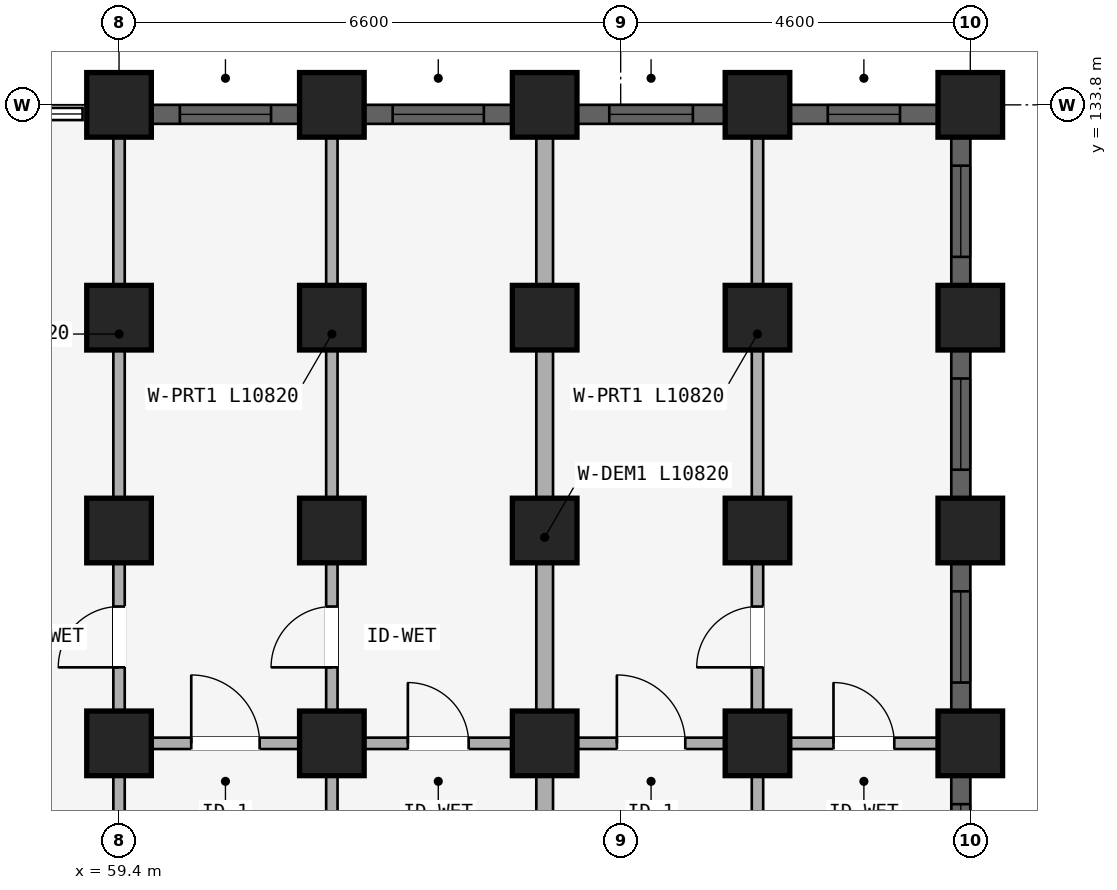
"""IFC4 building model, lengths in metres.
Left out: names, types, materials, properties, quantities, classifications, styles, units other than length and angle.
Written with IfcOpenShell. Run it as: python <this file> out.ifc"""

import sys

from ifc_helpers import new_model, si_unit, direction, frame, frame_2d, origin, origin_2d, place, context, subcontext, project, spatial, rectangle, extrude, element, fill, save


model = new_model("IFC4")
c1 = context("Model", 3, precision=1e-05, world=origin(), true_north=direction((0.0, 1.0)))
c2 = subcontext(c1, "Body", "Model", "MODEL_VIEW")
j1 = project(units=[si_unit("LENGTHUNIT", "METRE"), si_unit("PLANEANGLEUNIT", "RADIAN")], contexts=[c1])
p1 = place(None, origin())
s1 = spatial("IfcSite", under=j1, at=p1, CompositionType="ELEMENT")
p2 = place(p1, origin())
s2 = spatial("IfcBuilding", under=s1, at=p2, CompositionType="ELEMENT")
p3 = place(p2, frame((0.0, 0.0, 4.5)))
s3 = spatial("IfcBuildingStorey", under=s2, at=p3, CompositionType="ELEMENT", Elevation=4.5)
for number, where, z_axis, x_axis in (
    (1, (59.4, 125.4, 0.0), (0.0, 0.0, 1.0), (1.0, 0.0, 0.0)),
    (2, (59.4, 128.2, 0.0), (0.0, 0.0, 1.0), (1.0, 0.0, 0.0)),
    (3, (59.4, 131.0, 0.0), (0.0, 0.0, 1.0), (1.0, 0.0, 0.0)),
    (4, (59.4, 133.8, 0.0), (0.0, 0.0, 1.0), (1.0, 0.0, 0.0)),
    (5, (62.2, 125.4, 0.0), (0.0, 0.0, 1.0), (1.0, 0.0, 0.0)),
    (6, (62.2, 128.2, 0.0), (0.0, 0.0, 1.0), (1.0, 0.0, 0.0)),
    (7, (62.2, 131.0, 0.0), (0.0, 0.0, 1.0), (1.0, 0.0, 0.0)),
    (8, (62.2, 133.8, 0.0), (0.0, 0.0, 1.0), (1.0, 0.0, 0.0)),
    (9, (65.0, 125.4, 0.0), (0.0, 0.0, 1.0), (1.0, 0.0, 0.0)),
    (10, (65.0, 128.2, 0.0), (0.0, 0.0, 1.0), (1.0, 0.0, 0.0)),
    (11, (65.0, 131.0, 0.0), (0.0, 0.0, 1.0), (1.0, 0.0, 0.0)),
    (12, (65.0, 133.8, 0.0), (0.0, 0.0, 1.0), (1.0, 0.0, 0.0)),
    (13, (67.8, 125.4, 0.0), (0.0, 0.0, 1.0), (1.0, 0.0, 0.0)),
    (14, (67.8, 128.2, 0.0), (0.0, 0.0, 1.0), (1.0, 0.0, 0.0)),
    (15, (67.8, 131.0, 0.0), (0.0, 0.0, 1.0), (1.0, 0.0, 0.0)),
    (16, (67.8, 133.8, 0.0), (0.0, 0.0, 1.0), (1.0, 0.0, 0.0)),
    (17, (70.6, 125.4, 0.0), (0.0, 0.0, 1.0), (1.0, 0.0, 0.0)),
    (18, (70.6, 128.2, 0.0), (0.0, 0.0, 1.0), (1.0, 0.0, 0.0)),
    (19, (70.6, 131.0, 0.0), (0.0, 0.0, 1.0), (1.0, 0.0, 0.0)),
    (20, (70.6, 133.8, 0.0), (0.0, 0.0, 1.0), (1.0, 0.0, 0.0)),
):
    element("IfcColumn", number, at=place(p3, frame(where, z_axis=z_axis, x_axis=x_axis)), inside=s3, PredefinedType="COLUMN", context=c2, shape_type="SweptSolid", body=[
        extrude(rectangle(XDim=0.85, YDim=0.85, at=origin_2d()), origin(), (0.0, 0.0, 1.0), 3.98),
    ])
p4 = place(p3, frame((59.48, 125.4, 0.0), z_axis=(0.0, 0.0, 1.0), x_axis=(1.0, 0.0, 0.0)))
e21 = element("IfcWall", 21, at=p4, inside=s3, PredefinedType="PLUMBINGWALL", context=c2, shape_type="SweptSolid", body=[
    extrude(rectangle(XDim=2.64, YDim=0.15, at=frame_2d((1.32, 0.0))), origin(), (0.0, 0.0, 1.0), 3.322),
])
p5 = place(p4, frame((0.87, 0.0, 0.0)))
e22 = element("IfcOpeningElement", 22, at=p5, cuts=e21, PredefinedType="OPENING", context=c2, shape_type="SweptSolid", body=[
    extrude(rectangle(XDim=0.9, YDim=2.1, at=frame_2d((0.45, 1.05))), frame((0.0, 0.085, 0.0), z_axis=(0.0, -1.0, 0.0), x_axis=(1.0, 0.0, 0.0)), (0.0, 0.0, 1.0), 0.17),
])
p6 = place(p3, frame((62.28, 125.4, 0.0), z_axis=(0.0, 0.0, 1.0), x_axis=(1.0, 0.0, 0.0)))
e23 = element("IfcWall", 23, at=p6, inside=s3, PredefinedType="PLUMBINGWALL", context=c2, shape_type="SweptSolid", body=[
    extrude(rectangle(XDim=2.64, YDim=0.15, at=frame_2d((1.32, 0.0))), origin(), (0.0, 0.0, 1.0), 3.322),
])
p7 = place(p6, frame((0.92, 0.0, 0.0)))
e24 = element("IfcOpeningElement", 24, at=p7, cuts=e23, PredefinedType="OPENING", context=c2, shape_type="SweptSolid", body=[
    extrude(rectangle(XDim=0.8, YDim=2.1, at=frame_2d((0.4, 1.05))), frame((0.0, 0.085, 0.0), z_axis=(0.0, -1.0, 0.0), x_axis=(1.0, 0.0, 0.0)), (0.0, 0.0, 1.0), 0.17),
])
p8 = place(p3, frame((65.08, 125.4, 0.0), z_axis=(0.0, 0.0, 1.0), x_axis=(1.0, 0.0, 0.0)))
e25 = element("IfcWall", 25, at=p8, inside=s3, PredefinedType="PLUMBINGWALL", context=c2, shape_type="SweptSolid", body=[
    extrude(rectangle(XDim=2.64, YDim=0.15, at=frame_2d((1.32, 0.0))), origin(), (0.0, 0.0, 1.0), 3.322),
])
p9 = place(p8, frame((0.87, 0.0, 0.0)))
e26 = element("IfcOpeningElement", 26, at=p9, cuts=e25, PredefinedType="OPENING", context=c2, shape_type="SweptSolid", body=[
    extrude(rectangle(XDim=0.9, YDim=2.1, at=frame_2d((0.45, 1.05))), frame((0.0, 0.085, 0.0), z_axis=(0.0, -1.0, 0.0), x_axis=(1.0, 0.0, 0.0)), (0.0, 0.0, 1.0), 0.17),
])
p10 = place(p3, frame((67.88, 125.4, 0.0), z_axis=(0.0, 0.0, 1.0), x_axis=(1.0, 0.0, 0.0)))
e27 = element("IfcWall", 27, at=p10, inside=s3, PredefinedType="PLUMBINGWALL", context=c2, shape_type="SweptSolid", body=[
    extrude(rectangle(XDim=2.64, YDim=0.15, at=frame_2d((1.32, 0.0))), origin(), (0.0, 0.0, 1.0), 3.322),
])
p11 = place(p10, frame((0.92, 0.0, 0.0)))
e28 = element("IfcOpeningElement", 28, at=p11, cuts=e27, PredefinedType="OPENING", context=c2, shape_type="SweptSolid", body=[
    extrude(rectangle(XDim=0.8, YDim=2.1, at=frame_2d((0.4, 1.05))), frame((0.0, 0.085, 0.0), z_axis=(0.0, -1.0, 0.0), x_axis=(1.0, 0.0, 0.0)), (0.0, 0.0, 1.0), 0.17),
])
p12 = place(p3, frame((59.4, 122.7, 0.0), z_axis=(0.0, 0.0, 1.0), x_axis=(0.0, 1.0, 0.0)))
e29 = element("IfcWall", 29, at=p12, inside=s3, PredefinedType="PARTITIONING", context=c2, shape_type="SweptSolid", body=[
    extrude(rectangle(XDim=10.82, YDim=0.15, at=frame_2d((5.41, 0.0))), origin(), (0.0, 0.0, 1.0), 3.322),
])
p13 = place(p12, frame((3.7, 0.0, 0.0)))
e30 = element("IfcOpeningElement", 30, at=p13, cuts=e29, PredefinedType="OPENING", context=c2, shape_type="SweptSolid", body=[
    extrude(rectangle(XDim=0.8, YDim=2.1, at=frame_2d((0.4, 1.05))), frame((0.0, 0.085, 0.0), z_axis=(0.0, -1.0, 0.0), x_axis=(1.0, 0.0, 0.0)), (0.0, 0.0, 1.0), 0.17),
])
p14 = place(p3, frame((62.2, 122.7, 0.0), z_axis=(0.0, 0.0, 1.0), x_axis=(0.0, 1.0, 0.0)))
e31 = element("IfcWall", 31, at=p14, inside=s3, PredefinedType="PARTITIONING", context=c2, shape_type="SweptSolid", body=[
    extrude(rectangle(XDim=10.82, YDim=0.15, at=frame_2d((5.41, 0.0))), origin(), (0.0, 0.0, 1.0), 3.322),
])
p15 = place(p14, frame((3.7, 0.0, 0.0)))
e32 = element("IfcOpeningElement", 32, at=p15, cuts=e31, PredefinedType="OPENING", context=c2, shape_type="SweptSolid", body=[
    extrude(rectangle(XDim=0.8, YDim=2.1, at=frame_2d((0.4, 1.05))), frame((0.0, 0.085, 0.0), z_axis=(0.0, -1.0, 0.0), x_axis=(1.0, 0.0, 0.0)), (0.0, 0.0, 1.0), 0.17),
])
p16 = place(p3, frame((65.0, 122.7, 0.0), z_axis=(0.0, 0.0, 1.0), x_axis=(0.0, 1.0, 0.0)))
e33 = element("IfcWall", 33, at=p16, inside=s3, PredefinedType="STANDARD", context=c2, shape_type="SweptSolid", body=[
    extrude(rectangle(XDim=10.82, YDim=0.22, at=frame_2d((5.41, 0.0))), origin(), (0.0, 0.0, 1.0), 3.322),
])
p17 = place(p3, frame((67.8, 122.7, 0.0), z_axis=(0.0, 0.0, 1.0), x_axis=(0.0, 1.0, 0.0)))
e34 = element("IfcWall", 34, at=p17, inside=s3, PredefinedType="PARTITIONING", context=c2, shape_type="SweptSolid", body=[
    extrude(rectangle(XDim=10.82, YDim=0.15, at=frame_2d((5.41, 0.0))), origin(), (0.0, 0.0, 1.0), 3.322),
])
p18 = place(p17, frame((3.7, 0.0, 0.0)))
e35 = element("IfcOpeningElement", 35, at=p18, cuts=e34, PredefinedType="OPENING", context=c2, shape_type="SweptSolid", body=[
    extrude(rectangle(XDim=0.8, YDim=2.1, at=frame_2d((0.4, 1.05))), frame((0.0, 0.085, 0.0), z_axis=(0.0, -1.0, 0.0), x_axis=(1.0, 0.0, 0.0)), (0.0, 0.0, 1.0), 0.17),
])
p19 = place(p3, frame((59.829, 133.675, 0.0), z_axis=(0.0, 0.0, 1.0), x_axis=(1.0, 0.0, 0.0)))
e36 = element("IfcWall", 36, at=p19, inside=s3, PredefinedType="STANDARD", context=c2, shape_type="SweptSolid", body=[
    extrude(rectangle(XDim=1.943, YDim=0.25, at=frame_2d((0.971, 0.0))), origin(), (0.0, 0.0, 1.0), 3.522),
])
p20 = place(p19, frame((0.372, 0.0, 0.88)))
e37 = element("IfcOpeningElement", 37, at=p20, cuts=e36, PredefinedType="OPENING", context=c2, shape_type="SweptSolid", body=[
    extrude(rectangle(XDim=1.2, YDim=1.5, at=frame_2d((0.6, 0.75))), frame((0.0, 0.135, 0.0), z_axis=(0.0, -1.0, 0.0), x_axis=(1.0, 0.0, 0.0)), (0.0, 0.0, 1.0), 0.27),
])
p21 = place(p3, frame((62.628, 133.675, 0.0), z_axis=(0.0, 0.0, 1.0), x_axis=(1.0, 0.0, 0.0)))
e38 = element("IfcWall", 38, at=p21, inside=s3, PredefinedType="STANDARD", context=c2, shape_type="SweptSolid", body=[
    extrude(rectangle(XDim=1.943, YDim=0.25, at=frame_2d((0.972, 0.0))), origin(), (0.0, 0.0, 1.0), 3.522),
])
p22 = place(p21, frame((0.372, 0.0, 0.88)))
e39 = element("IfcOpeningElement", 39, at=p22, cuts=e38, PredefinedType="OPENING", context=c2, shape_type="SweptSolid", body=[
    extrude(rectangle(XDim=1.2, YDim=1.5, at=frame_2d((0.6, 0.75))), frame((0.0, 0.135, 0.0), z_axis=(0.0, -1.0, 0.0), x_axis=(1.0, 0.0, 0.0)), (0.0, 0.0, 1.0), 0.27),
])
p23 = place(p3, frame((65.428, 133.675, 0.0), z_axis=(0.0, 0.0, 1.0), x_axis=(1.0, 0.0, 0.0)))
e40 = element("IfcWall", 40, at=p23, inside=s3, PredefinedType="STANDARD", context=c2, shape_type="SweptSolid", body=[
    extrude(rectangle(XDim=1.943, YDim=0.25, at=frame_2d((0.972, 0.0))), origin(), (0.0, 0.0, 1.0), 3.522),
])
p24 = place(p23, frame((0.421, 0.0, 0.88)))
e41 = element("IfcOpeningElement", 41, at=p24, cuts=e40, PredefinedType="OPENING", context=c2, shape_type="SweptSolid", body=[
    extrude(rectangle(XDim=1.1, YDim=1.45, at=frame_2d((0.55, 0.725))), frame((0.0, 0.135, 0.0), z_axis=(0.0, -1.0, 0.0), x_axis=(1.0, 0.0, 0.0)), (0.0, 0.0, 1.0), 0.27),
])
p25 = place(p3, frame((68.229, 133.675, 0.0), z_axis=(0.0, 0.0, 1.0), x_axis=(1.0, 0.0, 0.0)))
e42 = element("IfcWall", 42, at=p25, inside=s3, PredefinedType="STANDARD", context=c2, shape_type="SweptSolid", body=[
    extrude(rectangle(XDim=1.943, YDim=0.25, at=frame_2d((0.971, 0.0))), origin(), (0.0, 0.0, 1.0), 3.522),
])
p26 = place(p25, frame((0.497, 0.0, 0.88)))
e43 = element("IfcOpeningElement", 43, at=p26, cuts=e42, PredefinedType="OPENING", context=c2, shape_type="SweptSolid", body=[
    extrude(rectangle(XDim=0.95, YDim=1.35, at=frame_2d((0.475, 0.675))), frame((0.0, 0.135, 0.0), z_axis=(0.0, -1.0, 0.0), x_axis=(1.0, 0.0, 0.0)), (0.0, 0.0, 1.0), 0.27),
])
p27 = place(p3, frame((70.475, 123.02, 0.0), z_axis=(0.0, 0.0, 1.0), x_axis=(0.0, 1.0, 0.0)))
e44 = element("IfcWall", 44, at=p27, inside=s3, PredefinedType="STANDARD", context=c2, shape_type="SweptSolid", body=[
    extrude(rectangle(XDim=1.96, YDim=0.25, at=frame_2d((0.98, 0.0))), origin(), (0.0, 0.0, 1.0), 3.322),
])
p28 = place(p27, frame((0.38, 0.0, 0.88)))
e45 = element("IfcOpeningElement", 45, at=p28, cuts=e44, PredefinedType="OPENING", context=c2, shape_type="SweptSolid", body=[
    extrude(rectangle(XDim=1.2, YDim=1.5, at=frame_2d((0.6, 0.75))), frame((0.0, 0.135, 0.0), z_axis=(0.0, -1.0, 0.0), x_axis=(1.0, 0.0, 0.0)), (0.0, 0.0, 1.0), 0.27),
])
p29 = place(p3, frame((70.475, 125.82, 0.0), z_axis=(0.0, 0.0, 1.0), x_axis=(0.0, 1.0, 0.0)))
e46 = element("IfcWall", 46, at=p29, inside=s3, PredefinedType="STANDARD", context=c2, shape_type="SweptSolid", body=[
    extrude(rectangle(XDim=1.96, YDim=0.25, at=frame_2d((0.98, 0.0))), origin(), (0.0, 0.0, 1.0), 3.322),
])
p30 = place(p29, frame((0.38, 0.0, 0.88)))
e47 = element("IfcOpeningElement", 47, at=p30, cuts=e46, PredefinedType="OPENING", context=c2, shape_type="SweptSolid", body=[
    extrude(rectangle(XDim=1.2, YDim=1.5, at=frame_2d((0.6, 0.75))), frame((0.0, 0.135, 0.0), z_axis=(0.0, -1.0, 0.0), x_axis=(1.0, 0.0, 0.0)), (0.0, 0.0, 1.0), 0.27),
])
p31 = place(p3, frame((70.475, 128.62, 0.0), z_axis=(0.0, 0.0, 1.0), x_axis=(0.0, 1.0, 0.0)))
e48 = element("IfcWall", 48, at=p31, inside=s3, PredefinedType="STANDARD", context=c2, shape_type="SweptSolid", body=[
    extrude(rectangle(XDim=1.96, YDim=0.25, at=frame_2d((0.98, 0.0))), origin(), (0.0, 0.0, 1.0), 3.322),
])
p32 = place(p31, frame((0.38, 0.0, 0.88)))
e49 = element("IfcOpeningElement", 49, at=p32, cuts=e48, PredefinedType="OPENING", context=c2, shape_type="SweptSolid", body=[
    extrude(rectangle(XDim=1.2, YDim=1.5, at=frame_2d((0.6, 0.75))), frame((0.0, 0.135, 0.0), z_axis=(0.0, -1.0, 0.0), x_axis=(1.0, 0.0, 0.0)), (0.0, 0.0, 1.0), 0.27),
])
p33 = place(p3, frame((70.475, 131.42, 0.0), z_axis=(0.0, 0.0, 1.0), x_axis=(0.0, 1.0, 0.0)))
e50 = element("IfcWall", 50, at=p33, inside=s3, PredefinedType="STANDARD", context=c2, shape_type="SweptSolid", body=[
    extrude(rectangle(XDim=1.96, YDim=0.25, at=frame_2d((0.98, 0.0))), origin(), (0.0, 0.0, 1.0), 3.322),
])
p34 = place(p33, frame((0.38, 0.0, 0.88)))
e51 = element("IfcOpeningElement", 51, at=p34, cuts=e50, PredefinedType="OPENING", context=c2, shape_type="SweptSolid", body=[
    extrude(rectangle(XDim=1.2, YDim=1.5, at=frame_2d((0.6, 0.75))), frame((0.0, 0.135, 0.0), z_axis=(0.0, -1.0, 0.0), x_axis=(1.0, 0.0, 0.0)), (0.0, 0.0, 1.0), 0.27),
])
p35 = place(p20, origin())
e52 = element("IfcWindow", 52, at=p35, inside=s3, PartitioningType="SINGLE_PANEL", PredefinedType="WINDOW", context=c2, shape_type="SweptSolid", body=[
    extrude(rectangle(XDim=1.2, YDim=1.5, at=frame_2d((0.6, 0.75))), frame((0.0, 0.03, 0.0), z_axis=(0.0, -1.0, 0.0), x_axis=(1.0, 0.0, 0.0)), (0.0, 0.0, 1.0), 0.06),
])
fill(e37, e52)
p36 = place(p22, origin())
e53 = element("IfcWindow", 53, at=p36, inside=s3, PartitioningType="SINGLE_PANEL", PredefinedType="WINDOW", context=c2, shape_type="SweptSolid", body=[
    extrude(rectangle(XDim=1.2, YDim=1.5, at=frame_2d((0.6, 0.75))), frame((0.0, 0.03, 0.0), z_axis=(0.0, -1.0, 0.0), x_axis=(1.0, 0.0, 0.0)), (0.0, 0.0, 1.0), 0.06),
])
fill(e39, e53)
p37 = place(p24, origin())
e54 = element("IfcWindow", 54, at=p37, inside=s3, PartitioningType="SINGLE_PANEL", PredefinedType="WINDOW", context=c2, shape_type="SweptSolid", body=[
    extrude(rectangle(XDim=1.1, YDim=1.45, at=frame_2d((0.55, 0.725))), frame((0.0, 0.03, 0.0), z_axis=(0.0, -1.0, 0.0), x_axis=(1.0, 0.0, 0.0)), (0.0, 0.0, 1.0), 0.06),
])
fill(e41, e54)
p38 = place(p26, origin())
e55 = element("IfcWindow", 55, at=p38, inside=s3, PartitioningType="SINGLE_PANEL", PredefinedType="WINDOW", context=c2, shape_type="SweptSolid", body=[
    extrude(rectangle(XDim=0.95, YDim=1.35, at=frame_2d((0.475, 0.675))), frame((0.0, 0.03, 0.0), z_axis=(0.0, -1.0, 0.0), x_axis=(1.0, 0.0, 0.0)), (0.0, 0.0, 1.0), 0.06),
])
fill(e43, e55)
p39 = place(p28, origin())
e56 = element("IfcWindow", 56, at=p39, inside=s3, PartitioningType="SINGLE_PANEL", PredefinedType="WINDOW", context=c2, shape_type="SweptSolid", body=[
    extrude(rectangle(XDim=1.2, YDim=1.5, at=frame_2d((0.6, 0.75))), frame((0.0, 0.03, 0.0), z_axis=(0.0, -1.0, 0.0), x_axis=(1.0, 0.0, 0.0)), (0.0, 0.0, 1.0), 0.06),
])
fill(e45, e56)
p40 = place(p30, origin())
e57 = element("IfcWindow", 57, at=p40, inside=s3, PartitioningType="SINGLE_PANEL", PredefinedType="WINDOW", context=c2, shape_type="SweptSolid", body=[
    extrude(rectangle(XDim=1.2, YDim=1.5, at=frame_2d((0.6, 0.75))), frame((0.0, 0.03, 0.0), z_axis=(0.0, -1.0, 0.0), x_axis=(1.0, 0.0, 0.0)), (0.0, 0.0, 1.0), 0.06),
])
fill(e47, e57)
p41 = place(p32, origin())
e58 = element("IfcWindow", 58, at=p41, inside=s3, PartitioningType="SINGLE_PANEL", PredefinedType="WINDOW", context=c2, shape_type="SweptSolid", body=[
    extrude(rectangle(XDim=1.2, YDim=1.5, at=frame_2d((0.6, 0.75))), frame((0.0, 0.03, 0.0), z_axis=(0.0, -1.0, 0.0), x_axis=(1.0, 0.0, 0.0)), (0.0, 0.0, 1.0), 0.06),
])
fill(e49, e58)
p42 = place(p34, origin())
e59 = element("IfcWindow", 59, at=p42, inside=s3, PartitioningType="SINGLE_PANEL", PredefinedType="WINDOW", context=c2, shape_type="SweptSolid", body=[
    extrude(rectangle(XDim=1.2, YDim=1.5, at=frame_2d((0.6, 0.75))), frame((0.0, 0.03, 0.0), z_axis=(0.0, -1.0, 0.0), x_axis=(1.0, 0.0, 0.0)), (0.0, 0.0, 1.0), 0.06),
])
fill(e51, e59)
p43 = place(p5, origin())
e60 = element("IfcDoor", 60, at=p43, inside=s3, OperationType="SINGLE_SWING_LEFT", PredefinedType="DOOR", context=c2, shape_type="SweptSolid", body=[
    extrude(rectangle(XDim=0.9, YDim=2.1, at=frame_2d((0.45, 1.05))), frame((0.0, 0.025, 0.0), z_axis=(0.0, -1.0, 0.0), x_axis=(1.0, 0.0, 0.0)), (0.0, 0.0, 1.0), 0.05),
])
fill(e22, e60)
p44 = place(p7, origin())
e61 = element("IfcDoor", 61, at=p44, inside=s3, OperationType="SINGLE_SWING_LEFT", PredefinedType="DOOR", context=c2, shape_type="SweptSolid", body=[
    extrude(rectangle(XDim=0.8, YDim=2.1, at=frame_2d((0.4, 1.05))), frame((0.0, 0.025, 0.0), z_axis=(0.0, -1.0, 0.0), x_axis=(1.0, 0.0, 0.0)), (0.0, 0.0, 1.0), 0.05),
])
fill(e24, e61)
p45 = place(p9, origin())
e62 = element("IfcDoor", 62, at=p45, inside=s3, OperationType="SINGLE_SWING_LEFT", PredefinedType="DOOR", context=c2, shape_type="SweptSolid", body=[
    extrude(rectangle(XDim=0.9, YDim=2.1, at=frame_2d((0.45, 1.05))), frame((0.0, 0.025, 0.0), z_axis=(0.0, -1.0, 0.0), x_axis=(1.0, 0.0, 0.0)), (0.0, 0.0, 1.0), 0.05),
])
fill(e26, e62)
p46 = place(p11, origin())
e63 = element("IfcDoor", 63, at=p46, inside=s3, OperationType="SINGLE_SWING_LEFT", PredefinedType="DOOR", context=c2, shape_type="SweptSolid", body=[
    extrude(rectangle(XDim=0.8, YDim=2.1, at=frame_2d((0.4, 1.05))), frame((0.0, 0.025, 0.0), z_axis=(0.0, -1.0, 0.0), x_axis=(1.0, 0.0, 0.0)), (0.0, 0.0, 1.0), 0.05),
])
fill(e28, e63)
p47 = place(p13, frame((0.8, 0.0, 0.0), z_axis=(0.0, 0.0, 1.0), x_axis=(-1.0, 0.0, 0.0)))
e64 = element("IfcDoor", 64, at=p47, inside=s3, OperationType="SINGLE_SWING_RIGHT", PredefinedType="DOOR", context=c2, shape_type="SweptSolid", body=[
    extrude(rectangle(XDim=0.8, YDim=2.1, at=frame_2d((0.4, 1.05))), frame((0.0, 0.025, 0.0), z_axis=(0.0, -1.0, 0.0), x_axis=(1.0, 0.0, 0.0)), (0.0, 0.0, 1.0), 0.05),
])
fill(e30, e64)
p48 = place(p15, origin())
e65 = element("IfcDoor", 65, at=p48, inside=s3, OperationType="SINGLE_SWING_LEFT", PredefinedType="DOOR", context=c2, shape_type="SweptSolid", body=[
    extrude(rectangle(XDim=0.8, YDim=2.1, at=frame_2d((0.4, 1.05))), frame((0.0, 0.025, 0.0), z_axis=(0.0, -1.0, 0.0), x_axis=(1.0, 0.0, 0.0)), (0.0, 0.0, 1.0), 0.05),
])
fill(e32, e65)
p49 = place(p18, frame((0.8, 0.0, 0.0), z_axis=(0.0, 0.0, 1.0), x_axis=(-1.0, 0.0, 0.0)))
e66 = element("IfcDoor", 66, at=p49, inside=s3, OperationType="SINGLE_SWING_RIGHT", PredefinedType="DOOR", context=c2, shape_type="SweptSolid", body=[
    extrude(rectangle(XDim=0.8, YDim=2.1, at=frame_2d((0.4, 1.05))), frame((0.0, 0.025, 0.0), z_axis=(0.0, -1.0, 0.0), x_axis=(1.0, 0.0, 0.0)), (0.0, 0.0, 1.0), 0.05),
])
fill(e35, e66)
save(model, sys.argv[1])
